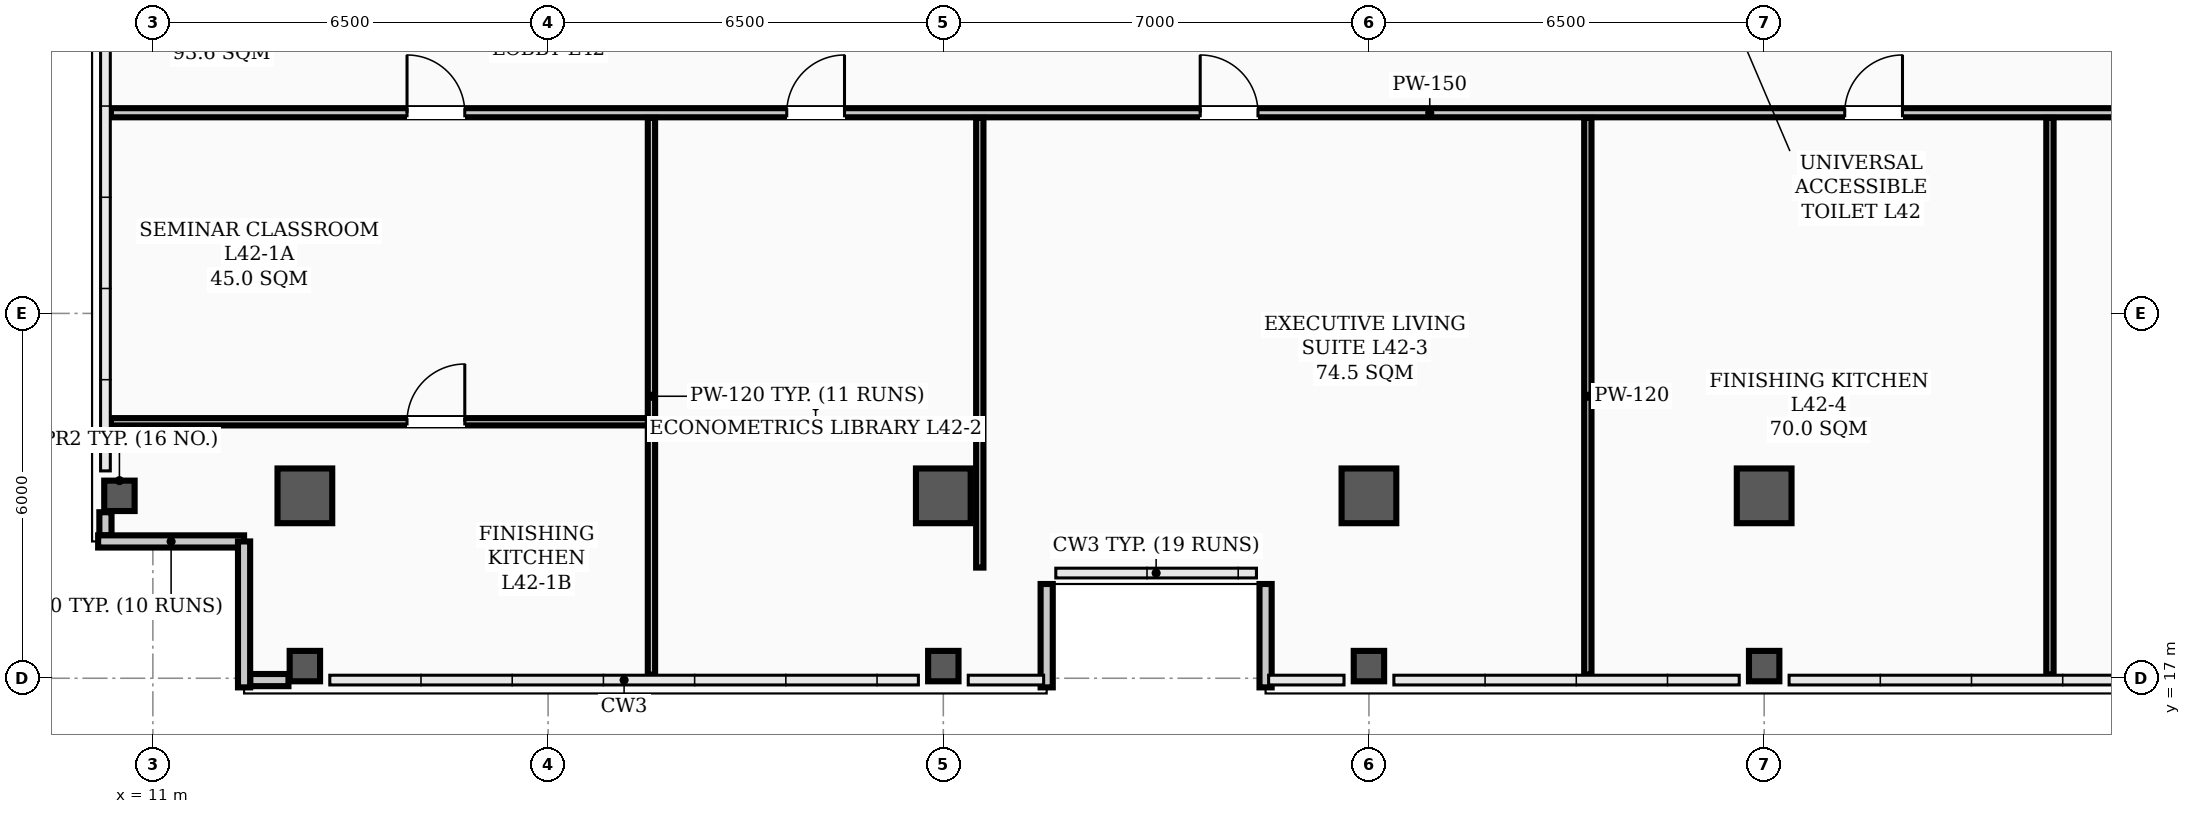
"""IFC4 building model, lengths in metres.
Left out: names, types, materials, properties, quantities, classifications, styles, units other than length and angle.
Written with IfcOpenShell. Run it as: python <this file> out.ifc"""

import sys

from ifc_helpers import new_model, si_unit, direction, frame, frame_2d, origin, origin_2d, place, context, subcontext, project, spatial, rectangle, hollow_rectangle, extrude, element, fill, save


model = new_model("IFC4")
c1 = context("Model", 3, precision=1e-05, world=origin(), true_north=direction((0.0, 1.0)))
c2 = subcontext(c1, "Body", "Model", "MODEL_VIEW")
j1 = project(units=[si_unit("LENGTHUNIT", "METRE"), si_unit("PLANEANGLEUNIT", "RADIAN")], contexts=[c1])
p1 = place(None, origin())
s1 = spatial("IfcSite", under=j1, at=p1, CompositionType="ELEMENT")
p2 = place(p1, origin())
s2 = spatial("IfcBuilding", under=s1, at=p2, CompositionType="ELEMENT")
p3 = place(p2, frame((0.0, 0.0, 169.5)))
s3 = spatial("IfcBuildingStorey", under=s2, at=p3, CompositionType="ELEMENT", Elevation=169.5)
for number, where, z_axis, x_axis in (
    (1, (13.5, 20.0, 0.0), (0.0, 0.0, 1.0), (1.0, 0.0, 0.0)),
    (2, (24.0, 20.0, 0.0), (0.0, 0.0, 1.0), (1.0, 0.0, 0.0)),
    (3, (31.0, 20.0, 0.0), (0.0, 0.0, 1.0), (1.0, 0.0, 0.0)),
    (4, (37.5, 20.0, 0.0), (0.0, 0.0, 1.0), (1.0, 0.0, 0.0)),
):
    element("IfcColumn", number, at=place(p3, frame(where, z_axis=z_axis, x_axis=x_axis)), inside=s3, PredefinedType="COLUMN", context=c2, shape_type="SweptSolid", body=[
        extrude(hollow_rectangle(XDim=0.9, YDim=0.9, WallThickness=0.035, InnerFilletRadius=0.017, OuterFilletRadius=0.052, at=origin_2d()), origin(), (0.0, 0.0, 1.0), 3.9),
    ])
for number, where, z_axis, x_axis in (
    (5, (10.45, 20.0, 0.0), (0.0, 0.0, 1.0), (1.0, 0.0, 0.0)),
    (6, (13.5, 17.2, 0.0), (0.0, 0.0, 1.0), (1.0, 0.0, 0.0)),
    (7, (24.0, 17.2, 0.0), (0.0, 0.0, 1.0), (1.0, 0.0, 0.0)),
    (8, (31.0, 17.2, 0.0), (0.0, 0.0, 1.0), (1.0, 0.0, 0.0)),
    (9, (37.5, 17.2, 0.0), (0.0, 0.0, 1.0), (1.0, 0.0, 0.0)),
):
    element("IfcColumn", number, at=place(p3, frame(where, z_axis=z_axis, x_axis=x_axis)), inside=s3, PredefinedType="COLUMN", context=c2, shape_type="SweptSolid", body=[
        extrude(hollow_rectangle(XDim=0.5, YDim=0.5, WallThickness=0.024, InnerFilletRadius=0.012, OuterFilletRadius=0.036, at=origin_2d()), origin(), (0.0, 0.0, 1.0), 3.9),
    ])
p4 = place(p3, frame((10.22, 19.35, 0.0), z_axis=(0.0, 0.0, 1.0), x_axis=(0.0, 1.0, 0.0)))
e10 = element("IfcWall", 10, at=p4, inside=s3, PredefinedType="PARAPET", context=c2, shape_type="SweptSolid", body=[
    extrude(rectangle(XDim=0.38, YDim=0.2, at=frame_2d((0.19, 0.0))), origin(), (0.0, 0.0, 1.0), 1.2),
])
p5 = place(p3, frame((12.6, 16.97, 0.0), z_axis=(0.0, 0.0, 1.0), x_axis=(1.0, 0.0, 0.0)))
e11 = element("IfcWall", 11, at=p5, inside=s3, PredefinedType="PARAPET", context=c2, shape_type="SweptSolid", body=[
    extrude(rectangle(XDim=0.63, YDim=0.2, at=frame_2d((0.315, 0.0))), origin(), (0.0, 0.0, 1.0), 1.2),
])
for number, where, z_axis, x_axis in (
    (12, (10.1, 19.25, 0.0), (0.0, 0.0, 1.0), (1.0, 0.0, 0.0)),
    (13, (12.5, 19.25, 0.0), (0.0, 0.0, 1.0), (0.0, -1.0, 0.0)),
):
    element("IfcWall", number, at=place(p3, frame(where, z_axis=z_axis, x_axis=x_axis)), inside=s3, PredefinedType="PARAPET", context=c2, shape_type="SweptSolid", body=[
        extrude(rectangle(XDim=2.4, YDim=0.2, at=frame_2d((1.2, 0.0))), origin(), (0.0, 0.0, 1.0), 1.2),
    ])
for number, where, z_axis, x_axis in (
    (14, (25.7, 16.85, 0.0), (0.0, 0.0, 1.0), (0.0, 1.0, 0.0)),
    (15, (29.3, 18.55, 0.0), (0.0, 0.0, 1.0), (0.0, -1.0, 0.0)),
):
    element("IfcWall", number, at=place(p3, frame(where, z_axis=z_axis, x_axis=x_axis)), inside=s3, PredefinedType="PARAPET", context=c2, shape_type="SweptSolid", body=[
        extrude(rectangle(XDim=1.7, YDim=0.2, at=frame_2d((0.85, 0.0))), origin(), (0.0, 0.0, 1.0), 1.2),
    ])
p6 = place(p3, frame((10.31, 26.3, 0.0), z_axis=(0.0, 0.0, 1.0), x_axis=(1.0, 0.0, 0.0)))
e16 = element("IfcWall", 16, at=p6, inside=s3, PredefinedType="PARTITIONING", context=c2, shape_type="SweptSolid", body=[
    extrude(rectangle(XDim=43.38, YDim=0.15, at=frame_2d((21.69, 0.0))), origin(), (0.0, 0.0, 1.0), 3.2),
])
p7 = place(p6, frame((4.87, 0.0, 0.0)))
e17 = element("IfcOpeningElement", 17, at=p7, cuts=e16, PredefinedType="OPENING", context=c2, shape_type="SweptSolid", body=[
    extrude(rectangle(XDim=0.95, YDim=2.08, at=frame_2d((0.475, 1.04))), frame((0.0, 0.085, 0.0), z_axis=(0.0, -1.0, 0.0), x_axis=(1.0, 0.0, 0.0)), (0.0, 0.0, 1.0), 0.17),
])
p8 = place(p6, frame((11.115, 0.0, 0.0)))
e18 = element("IfcOpeningElement", 18, at=p8, cuts=e16, PredefinedType="OPENING", context=c2, shape_type="SweptSolid", body=[
    extrude(rectangle(XDim=0.95, YDim=2.08, at=frame_2d((0.475, 1.04))), frame((0.0, 0.085, 0.0), z_axis=(0.0, -1.0, 0.0), x_axis=(1.0, 0.0, 0.0)), (0.0, 0.0, 1.0), 0.17),
])
p9 = place(p6, frame((17.915, 0.0, 0.0)))
e19 = element("IfcOpeningElement", 19, at=p9, cuts=e16, PredefinedType="OPENING", context=c2, shape_type="SweptSolid", body=[
    extrude(rectangle(XDim=0.95, YDim=2.08, at=frame_2d((0.475, 1.04))), frame((0.0, 0.085, 0.0), z_axis=(0.0, -1.0, 0.0), x_axis=(1.0, 0.0, 0.0)), (0.0, 0.0, 1.0), 0.17),
])
p10 = place(p6, frame((28.515, 0.0, 0.0)))
e20 = element("IfcOpeningElement", 20, at=p10, cuts=e16, PredefinedType="OPENING", context=c2, shape_type="SweptSolid", body=[
    extrude(rectangle(XDim=0.95, YDim=2.08, at=frame_2d((0.475, 1.04))), frame((0.0, 0.085, 0.0), z_axis=(0.0, -1.0, 0.0), x_axis=(1.0, 0.0, 0.0)), (0.0, 0.0, 1.0), 0.17),
])
p11 = place(p6, frame((33.49, 0.0, 0.0)))
e21 = element("IfcOpeningElement", 21, at=p11, cuts=e16, PredefinedType="OPENING", context=c2, shape_type="SweptSolid", body=[
    extrude(rectangle(XDim=0.95, YDim=2.08, at=frame_2d((0.475, 1.04))), frame((0.0, 0.085, 0.0), z_axis=(0.0, -1.0, 0.0), x_axis=(1.0, 0.0, 0.0)), (0.0, 0.0, 1.0), 0.17),
])
p12 = place(p3, frame((10.31, 21.218, 0.0), z_axis=(0.0, 0.0, 1.0), x_axis=(1.0, 0.0, 0.0)))
e22 = element("IfcWall", 22, at=p12, inside=s3, PredefinedType="PARTITIONING", context=c2, shape_type="SweptSolid", body=[
    extrude(rectangle(XDim=8.89, YDim=0.12, at=frame_2d((4.445, 0.0))), origin(), (0.0, 0.0, 1.0), 3.2),
])
p13 = place(p12, frame((4.87, 0.0, 0.0)))
e23 = element("IfcOpeningElement", 23, at=p13, cuts=e22, PredefinedType="OPENING", context=c2, shape_type="SweptSolid", body=[
    extrude(rectangle(XDim=0.95, YDim=2.08, at=frame_2d((0.475, 1.04))), frame((0.0, 0.07, 0.0), z_axis=(0.0, -1.0, 0.0), x_axis=(1.0, 0.0, 0.0)), (0.0, 0.0, 1.0), 0.14),
])
p14 = place(p3, frame((19.2, 17.06, 0.0), z_axis=(0.0, 0.0, 1.0), x_axis=(0.0, 1.0, 0.0)))
e24 = element("IfcWall", 24, at=p14, inside=s3, PredefinedType="PARTITIONING", context=c2, shape_type="SweptSolid", body=[
    extrude(rectangle(XDim=9.155, YDim=0.12, at=frame_2d((4.578, 0.0))), origin(), (0.0, 0.0, 1.0), 3.1),
])
p15 = place(p3, frame((24.6, 18.82, 0.0), z_axis=(0.0, 0.0, 1.0), x_axis=(0.0, 1.0, 0.0)))
e25 = element("IfcWall", 25, at=p15, inside=s3, PredefinedType="PARTITIONING", context=c2, shape_type="SweptSolid", body=[
    extrude(rectangle(XDim=7.395, YDim=0.12, at=frame_2d((3.698, 0.0))), origin(), (0.0, 0.0, 1.0), 3.1),
])
for number, where, z_axis, x_axis in (
    (26, (34.6, 17.06, 0.0), (0.0, 0.0, 1.0), (0.0, 1.0, 0.0)),
    (27, (42.2, 17.06, 0.0), (0.0, 0.0, 1.0), (0.0, 1.0, 0.0)),
):
    element("IfcWall", number, at=place(p3, frame(where, z_axis=z_axis, x_axis=x_axis)), inside=s3, PredefinedType="PARTITIONING", context=c2, shape_type="SweptSolid", body=[
        extrude(rectangle(XDim=9.155, YDim=0.12, at=frame_2d((4.578, 0.0))), origin(), (0.0, 0.0, 1.0), 3.1),
    ])
p16 = place(p13, origin())
e28 = element("IfcDoor", 28, at=p16, inside=s3, OperationType="SINGLE_SWING_RIGHT", PredefinedType="DOOR", context=c2, shape_type="SweptSolid", body=[
    extrude(rectangle(XDim=0.95, YDim=2.08, at=frame_2d((0.475, 1.04))), frame((0.0, 0.025, 0.0), z_axis=(0.0, -1.0, 0.0), x_axis=(1.0, 0.0, 0.0)), (0.0, 0.0, 1.0), 0.05),
])
fill(e23, e28)
p17 = place(p7, origin())
e29 = element("IfcDoor", 29, at=p17, inside=s3, OperationType="SINGLE_SWING_LEFT", PredefinedType="DOOR", context=c2, shape_type="SweptSolid", body=[
    extrude(rectangle(XDim=0.95, YDim=2.08, at=frame_2d((0.475, 1.04))), frame((0.0, 0.025, 0.0), z_axis=(0.0, -1.0, 0.0), x_axis=(1.0, 0.0, 0.0)), (0.0, 0.0, 1.0), 0.05),
])
fill(e17, e29)
p18 = place(p8, origin())
e30 = element("IfcDoor", 30, at=p18, inside=s3, OperationType="SINGLE_SWING_RIGHT", PredefinedType="DOOR", context=c2, shape_type="SweptSolid", body=[
    extrude(rectangle(XDim=0.95, YDim=2.08, at=frame_2d((0.475, 1.04))), frame((0.0, 0.025, 0.0), z_axis=(0.0, -1.0, 0.0), x_axis=(1.0, 0.0, 0.0)), (0.0, 0.0, 1.0), 0.05),
])
fill(e18, e30)
p19 = place(p9, origin())
e31 = element("IfcDoor", 31, at=p19, inside=s3, OperationType="SINGLE_SWING_LEFT", PredefinedType="DOOR", context=c2, shape_type="SweptSolid", body=[
    extrude(rectangle(XDim=0.95, YDim=2.08, at=frame_2d((0.475, 1.04))), frame((0.0, 0.025, 0.0), z_axis=(0.0, -1.0, 0.0), x_axis=(1.0, 0.0, 0.0)), (0.0, 0.0, 1.0), 0.05),
])
fill(e19, e31)
p20 = place(p10, origin())
e32 = element("IfcDoor", 32, at=p20, inside=s3, OperationType="SINGLE_SWING_RIGHT", PredefinedType="DOOR", context=c2, shape_type="SweptSolid", body=[
    extrude(rectangle(XDim=0.95, YDim=2.08, at=frame_2d((0.475, 1.04))), frame((0.0, 0.025, 0.0), z_axis=(0.0, -1.0, 0.0), x_axis=(1.0, 0.0, 0.0)), (0.0, 0.0, 1.0), 0.05),
])
fill(e20, e32)
save(model, sys.argv[1])
